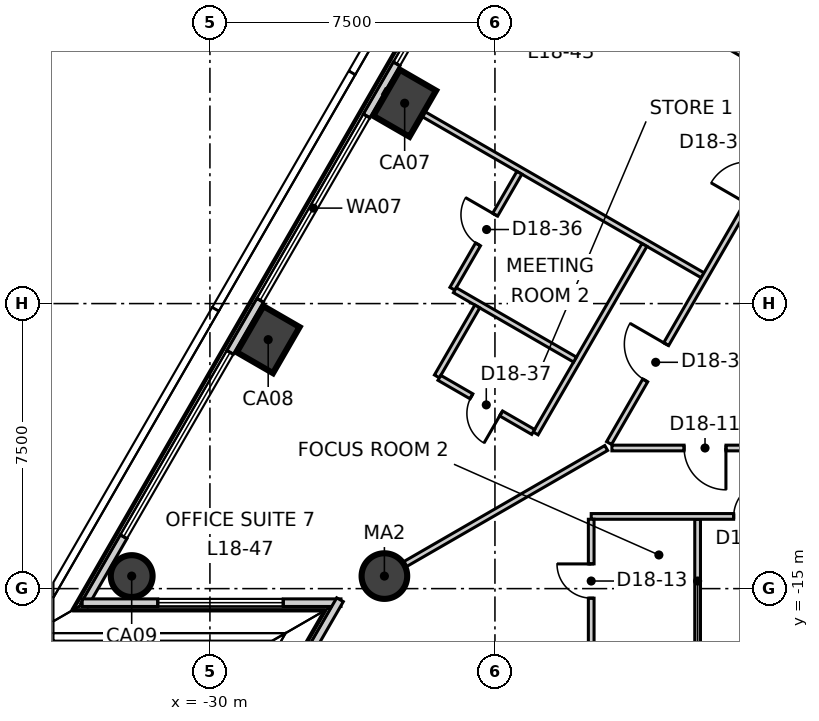
"""IFC4 building model, lengths in metres.
Left out: names, types, materials, properties, quantities, classifications, styles, units other than length and angle.
Written with IfcOpenShell. Run it as: python <this file> out.ifc"""

import sys

from ifc_helpers import new_model, si_unit, direction, frame, frame_2d, origin, origin_2d, place, context, subcontext, project, spatial, rectangle, circle, extrude, element, fill, save


model = new_model("IFC4")
c1 = context("Model", 3, precision=1e-05, world=origin(), true_north=direction((0.0, 1.0)))
c2 = subcontext(c1, "Body", "Model", "MODEL_VIEW")
j1 = project(units=[si_unit("LENGTHUNIT", "METRE"), si_unit("PLANEANGLEUNIT", "RADIAN")], contexts=[c1])
p1 = place(None, origin())
s1 = spatial("IfcSite", under=j1, at=p1, CompositionType="ELEMENT")
p2 = place(p1, origin())
s2 = spatial("IfcBuilding", under=s1, at=p2, CompositionType="ELEMENT")
p3 = place(p2, frame((0.0, 0.0, 83.3)))
s3 = spatial("IfcBuildingStorey", under=s2, at=p3, CompositionType="ELEMENT", Elevation=83.3)
for number, where, z_axis, x_axis in (
    (1, (-24.876, -2.228, -0.3), (0.0, 0.0, 1.0), (0.5, 0.866, 0.0)),
    (2, (-28.467, -8.449, -0.3), (0.0, 0.0, 1.0), (0.5, 0.866, 0.0)),
):
    element("IfcColumn", number, at=place(p3, frame(where, z_axis=z_axis, x_axis=x_axis)), inside=s3, PredefinedType="COLUMN", context=c2, shape_type="SweptSolid", body=[
        extrude(rectangle(XDim=1.4, YDim=1.1, at=origin_2d()), origin(), (0.0, 0.0, 1.0), 4.0),
    ])
p4 = place(p3, frame((-32.059, -14.67, -0.3), z_axis=(0.0, 0.0, 1.0), x_axis=(0.5, 0.866025403784, 0.0)))
e3 = element("IfcColumn", 3, at=p4, inside=s3, PredefinedType="COLUMN", context=c2, shape_type="SweptSolid", body=[
    extrude(circle(Radius=0.55, at=origin_2d()), origin(), (0.0, 0.0, 1.0), 4.0),
])
p5 = place(p3, frame((-25.409, -14.67, -0.3), z_axis=(0.0, 0.0, 1.0), x_axis=(1.0, 0.0, 0.0)))
e4 = element("IfcColumn", 4, at=p5, inside=s3, PredefinedType="COLUMN", context=c2, shape_type="SweptSolid", body=[
    extrude(circle(Radius=0.6, at=origin_2d()), origin(), (0.0, 0.0, 1.0), 4.0),
])
p6 = place(p3, frame((-3.28, 36.577, 0.0), z_axis=(0.0, 0.0, 1.0), x_axis=(-0.500001635065, -0.866024459777, 0.0)))
e5 = element("IfcWall", 5, at=p6, inside=s3, PredefinedType="ELEMENTEDWALL", context=c2, shape_type="SweptSolid", body=[
    extrude(rectangle(XDim=60.053, YDim=0.2, at=frame_2d((30.027, 0.0))), origin(), (0.0, 0.0, 1.0), 3.7),
])
p7 = place(p6, frame((2.094, 0.0, 0.9)))
e6 = element("IfcOpeningElement", 6, at=p7, cuts=e5, PredefinedType="OPENING", context=c2, shape_type="SweptSolid", body=[
    extrude(rectangle(XDim=5.6, YDim=2.5, at=frame_2d((2.8, 1.25))), frame((0.0, 0.11, 0.0), z_axis=(0.0, -1.0, 0.0), x_axis=(1.0, 0.0, 0.0)), (0.0, 0.0, 1.0), 0.22),
])
p8 = place(p6, frame((9.278, 0.0, 0.9)))
e7 = element("IfcOpeningElement", 7, at=p8, cuts=e5, PredefinedType="OPENING", context=c2, shape_type="SweptSolid", body=[
    extrude(rectangle(XDim=5.6, YDim=2.5, at=frame_2d((2.8, 1.25))), frame((0.0, 0.11, 0.0), z_axis=(0.0, -1.0, 0.0), x_axis=(1.0, 0.0, 0.0)), (0.0, 0.0, 1.0), 0.22),
])
p9 = place(p6, frame((16.461, 0.0, 0.9)))
e8 = element("IfcOpeningElement", 8, at=p9, cuts=e5, PredefinedType="OPENING", context=c2, shape_type="SweptSolid", body=[
    extrude(rectangle(XDim=5.6, YDim=2.5, at=frame_2d((2.8, 1.25))), frame((0.0, 0.11, 0.0), z_axis=(0.0, -1.0, 0.0), x_axis=(1.0, 0.0, 0.0)), (0.0, 0.0, 1.0), 0.22),
])
p10 = place(p6, frame((23.645, 0.0, 0.9)))
e9 = element("IfcOpeningElement", 9, at=p10, cuts=e5, PredefinedType="OPENING", context=c2, shape_type="SweptSolid", body=[
    extrude(rectangle(XDim=5.6, YDim=2.5, at=frame_2d((2.8, 1.25))), frame((0.0, 0.11, 0.0), z_axis=(0.0, -1.0, 0.0), x_axis=(1.0, 0.0, 0.0)), (0.0, 0.0, 1.0), 0.22),
])
p11 = place(p6, frame((30.828, 0.0, 0.9)))
e10 = element("IfcOpeningElement", 10, at=p11, cuts=e5, PredefinedType="OPENING", context=c2, shape_type="SweptSolid", body=[
    extrude(rectangle(XDim=5.6, YDim=2.5, at=frame_2d((2.8, 1.25))), frame((0.0, 0.11, 0.0), z_axis=(0.0, -1.0, 0.0), x_axis=(1.0, 0.0, 0.0)), (0.0, 0.0, 1.0), 0.22),
])
p12 = place(p6, frame((38.012, 0.0, 0.9)))
e11 = element("IfcOpeningElement", 11, at=p12, cuts=e5, PredefinedType="OPENING", context=c2, shape_type="SweptSolid", body=[
    extrude(rectangle(XDim=5.6, YDim=2.5, at=frame_2d((2.8, 1.25))), frame((0.0, 0.11, 0.0), z_axis=(0.0, -1.0, 0.0), x_axis=(1.0, 0.0, 0.0)), (0.0, 0.0, 1.0), 0.22),
])
p13 = place(p6, frame((45.195, 0.0, 0.9)))
e12 = element("IfcOpeningElement", 12, at=p13, cuts=e5, PredefinedType="OPENING", context=c2, shape_type="SweptSolid", body=[
    extrude(rectangle(XDim=5.6, YDim=2.5, at=frame_2d((2.8, 1.25))), frame((0.0, 0.11, 0.0), z_axis=(0.0, -1.0, 0.0), x_axis=(1.0, 0.0, 0.0)), (0.0, 0.0, 1.0), 0.22),
])
p14 = place(p6, frame((52.379, 0.0, 0.9)))
e13 = element("IfcOpeningElement", 13, at=p14, cuts=e5, PredefinedType="OPENING", context=c2, shape_type="SweptSolid", body=[
    extrude(rectangle(XDim=5.6, YDim=2.5, at=frame_2d((2.8, 1.25))), frame((0.0, 0.11, 0.0), z_axis=(0.0, -1.0, 0.0), x_axis=(1.0, 0.0, 0.0)), (0.0, 0.0, 1.0), 0.22),
])
p15 = place(p3, frame((-33.362, -15.37, 0.0), z_axis=(0.0, 0.0, 1.0), x_axis=(1.0, 0.0, 0.0)))
e14 = element("IfcWall", 14, at=p15, inside=s3, PredefinedType="ELEMENTEDWALL", context=c2, shape_type="SweptSolid", body=[
    extrude(rectangle(XDim=6.81, YDim=0.2, at=frame_2d((3.405, 0.0))), origin(), (0.0, 0.0, 1.0), 3.7),
])
p16 = place(p15, frame((1.99, 0.0, 0.9)))
e15 = element("IfcOpeningElement", 15, at=p16, cuts=e14, PredefinedType="OPENING", context=c2, shape_type="SweptSolid", body=[
    extrude(rectangle(XDim=3.3, YDim=2.5, at=frame_2d((1.65, 1.25))), frame((0.0, 0.11, 0.0), z_axis=(0.0, -1.0, 0.0), x_axis=(1.0, 0.0, 0.0)), (0.0, 0.0, 1.0), 0.22),
])
p17 = place(p3, frame((-26.577, -15.292, 0.0), z_axis=(0.0, 0.0, 1.0), x_axis=(-0.499983120418, -0.866035148996, 0.0)))
e16 = element("IfcWall", 16, at=p17, inside=s3, PredefinedType="ELEMENTEDWALL", context=c2, shape_type="SweptSolid", body=[
    extrude(rectangle(XDim=6.81, YDim=0.2, at=frame_2d((3.405, 0.0))), origin(), (0.0, 0.0, 1.0), 3.7),
])
p18 = place(p17, frame((1.39, 0.0, 0.9)))
e17 = element("IfcOpeningElement", 17, at=p18, cuts=e16, PredefinedType="OPENING", context=c2, shape_type="SweptSolid", body=[
    extrude(rectangle(XDim=3.3, YDim=2.5, at=frame_2d((1.65, 1.25))), frame((0.0, 0.11, 0.0), z_axis=(0.0, -1.0, 0.0), x_axis=(1.0, 0.0, 0.0)), (0.0, 0.0, 1.0), 0.22),
])
p19 = place(p3, frame((-25.946, -14.98, 0.0), z_axis=(0.0, 0.0, 1.0), x_axis=(0.866032022822, 0.499988535315, 0.0)))
e18 = element("IfcWall", 18, at=p19, inside=s3, PredefinedType="PARTITIONING", context=c2, shape_type="SweptSolid", body=[
    extrude(rectangle(XDim=7.36, YDim=0.15, at=frame_2d((3.68, 0.0))), origin(), (0.0, 0.0, 1.0), 3.15),
])
p20 = place(p3, frame((-25.413, -1.918, 0.0), z_axis=(0.0, 0.0, 1.0), x_axis=(0.866035557451, -0.499982412921, 0.0)))
e19 = element("IfcWall", 19, at=p20, inside=s3, PredefinedType="PARTITIONING", context=c2, shape_type="SweptSolid", body=[
    extrude(rectangle(XDim=9.674, YDim=0.15, at=frame_2d((4.837, 0.0))), origin(), (0.0, 0.0, 1.0), 3.7),
])
p21 = place(p3, frame((-19.497, -11.17, 0.0), z_axis=(0.0, 0.0, 1.0), x_axis=(0.499998854553, 0.866026065108, 0.0)))
e20 = element("IfcWall", 20, at=p21, inside=s3, PredefinedType="PARTITIONING", context=c2, shape_type="SweptSolid", body=[
    extrude(rectangle(XDim=38.994, YDim=0.15, at=frame_2d((19.497, 0.0))), origin(), (0.0, 0.0, 1.0), 3.7),
])
p22 = place(p21, frame((35.844, 0.0, 0.0)))
e21 = element("IfcOpeningElement", 21, at=p22, cuts=e20, PredefinedType="OPENING", context=c2, shape_type="SweptSolid", body=[
    extrude(rectangle(XDim=1.1, YDim=2.1, at=frame_2d((0.55, 1.05))), frame((0.0, 0.085, 0.0), z_axis=(0.0, -1.0, 0.0), x_axis=(1.0, 0.0, 0.0)), (0.0, 0.0, 1.0), 0.17),
])
p23 = place(p21, frame((26.04, 0.0, 0.0)))
e22 = element("IfcOpeningElement", 22, at=p23, cuts=e20, PredefinedType="OPENING", context=c2, shape_type="SweptSolid", body=[
    extrude(rectangle(XDim=1.1, YDim=2.1, at=frame_2d((0.55, 1.05))), frame((0.0, 0.085, 0.0), z_axis=(0.0, -1.0, 0.0), x_axis=(1.0, 0.0, 0.0)), (0.0, 0.0, 1.0), 0.17),
])
p24 = place(p21, frame((7.272, 0.0, 0.0)))
e23 = element("IfcOpeningElement", 23, at=p24, cuts=e20, PredefinedType="OPENING", context=c2, shape_type="SweptSolid", body=[
    extrude(rectangle(XDim=1.1, YDim=2.1, at=frame_2d((0.55, 1.05))), frame((0.0, 0.085, 0.0), z_axis=(0.0, -1.0, 0.0), x_axis=(1.0, 0.0, 0.0)), (0.0, 0.0, 1.0), 0.17),
])
p25 = place(p21, frame((17.372, 0.0, 0.0)))
e24 = element("IfcOpeningElement", 24, at=p25, cuts=e20, PredefinedType="OPENING", context=c2, shape_type="SweptSolid", body=[
    extrude(rectangle(XDim=0.9, YDim=2.1, at=frame_2d((0.45, 1.05))), frame((0.0, 0.085, 0.0), z_axis=(0.0, -1.0, 0.0), x_axis=(1.0, 0.0, 0.0)), (0.0, 0.0, 1.0), 0.17),
])
p26 = place(p21, frame((14.172, 0.0, 0.0)))
e25 = element("IfcOpeningElement", 25, at=p26, cuts=e20, PredefinedType="OPENING", context=c2, shape_type="SweptSolid", body=[
    extrude(rectangle(XDim=0.9, YDim=2.1, at=frame_2d((0.45, 1.05))), frame((0.0, 0.085, 0.0), z_axis=(0.0, -1.0, 0.0), x_axis=(1.0, 0.0, 0.0)), (0.0, 0.0, 1.0), 0.17),
])
p27 = place(p21, frame((11.272, 0.0, 0.0)))
e26 = element("IfcOpeningElement", 26, at=p27, cuts=e20, PredefinedType="OPENING", context=c2, shape_type="SweptSolid", body=[
    extrude(rectangle(XDim=1.0, YDim=2.1, at=frame_2d((0.5, 1.05))), frame((0.0, 0.085, 0.0), z_axis=(0.0, -1.0, 0.0), x_axis=(1.0, 0.0, 0.0)), (0.0, 0.0, 1.0), 0.17),
])
p28 = place(p21, frame((1.904, 0.0, 0.0)))
e27 = element("IfcOpeningElement", 27, at=p28, cuts=e20, PredefinedType="OPENING", context=c2, shape_type="SweptSolid", body=[
    extrude(rectangle(XDim=1.1, YDim=2.1, at=frame_2d((0.55, 1.05))), frame((0.0, 0.085, 0.0), z_axis=(0.0, -1.0, 0.0), x_axis=(1.0, 0.0, 0.0)), (0.0, 0.0, 1.0), 0.17),
])
p29 = place(p3, frame((-19.422, -11.3, 0.0), z_axis=(0.0, 0.0, 1.0), x_axis=(1.0, 0.0, 0.0)))
e28 = element("IfcWall", 28, at=p29, inside=s3, PredefinedType="PARTITIONING", context=c2, shape_type="SweptSolid", body=[
    extrude(rectangle(XDim=38.994, YDim=0.15, at=frame_2d((19.497, 0.0))), origin(), (0.0, 0.0, 1.0), 3.7),
])
p30 = place(p29, frame((1.9, 0.0, 0.0)))
e29 = element("IfcOpeningElement", 29, at=p30, cuts=e28, PredefinedType="OPENING", context=c2, shape_type="SweptSolid", body=[
    extrude(rectangle(XDim=1.1, YDim=2.1, at=frame_2d((0.55, 1.05))), frame((0.0, 0.085, 0.0), z_axis=(0.0, -1.0, 0.0), x_axis=(1.0, 0.0, 0.0)), (0.0, 0.0, 1.0), 0.17),
])
p31 = place(p29, frame((11.705, 0.0, 0.0)))
e30 = element("IfcOpeningElement", 30, at=p31, cuts=e28, PredefinedType="OPENING", context=c2, shape_type="SweptSolid", body=[
    extrude(rectangle(XDim=1.1, YDim=2.1, at=frame_2d((0.55, 1.05))), frame((0.0, 0.085, 0.0), z_axis=(0.0, -1.0, 0.0), x_axis=(1.0, 0.0, 0.0)), (0.0, 0.0, 1.0), 0.17),
])
p32 = place(p29, frame((6.405, 0.0, 0.0)))
e31 = element("IfcOpeningElement", 31, at=p32, cuts=e28, PredefinedType="OPENING", context=c2, shape_type="SweptSolid", body=[
    extrude(rectangle(XDim=0.9, YDim=2.1, at=frame_2d((0.45, 1.05))), frame((0.0, 0.085, 0.0), z_axis=(0.0, -1.0, 0.0), x_axis=(1.0, 0.0, 0.0)), (0.0, 0.0, 1.0), 0.17),
])
p33 = place(p29, frame((9.405, 0.0, 0.0)))
e32 = element("IfcOpeningElement", 32, at=p33, cuts=e28, PredefinedType="OPENING", context=c2, shape_type="SweptSolid", body=[
    extrude(rectangle(XDim=0.9, YDim=2.1, at=frame_2d((0.45, 1.05))), frame((0.0, 0.085, 0.0), z_axis=(0.0, -1.0, 0.0), x_axis=(1.0, 0.0, 0.0)), (0.0, 0.0, 1.0), 0.17),
])
p34 = place(p29, frame((22.472, 0.0, 0.0)))
e33 = element("IfcOpeningElement", 33, at=p34, cuts=e28, PredefinedType="OPENING", context=c2, shape_type="SweptSolid", body=[
    extrude(rectangle(XDim=1.0, YDim=2.1, at=frame_2d((0.5, 1.05))), frame((0.0, 0.085, 0.0), z_axis=(0.0, -1.0, 0.0), x_axis=(1.0, 0.0, 0.0)), (0.0, 0.0, 1.0), 0.17),
])
p35 = place(p29, frame((29.656, 0.0, 0.0)))
e34 = element("IfcOpeningElement", 34, at=p35, cuts=e28, PredefinedType="OPENING", context=c2, shape_type="SweptSolid", body=[
    extrude(rectangle(XDim=1.0, YDim=2.1, at=frame_2d((0.5, 1.05))), frame((0.0, 0.085, 0.0), z_axis=(0.0, -1.0, 0.0), x_axis=(1.0, 0.0, 0.0)), (0.0, 0.0, 1.0), 0.17),
])
p36 = place(p29, frame((35.839, 0.0, 0.0)))
e35 = element("IfcOpeningElement", 35, at=p36, cuts=e28, PredefinedType="OPENING", context=c2, shape_type="SweptSolid", body=[
    extrude(rectangle(XDim=1.1, YDim=2.1, at=frame_2d((0.55, 1.05))), frame((0.0, 0.085, 0.0), z_axis=(0.0, -1.0, 0.0), x_axis=(1.0, 0.0, 0.0)), (0.0, 0.0, 1.0), 0.17),
])
p37 = place(p3, frame((-17.239, -0.209, 0.0), z_axis=(0.0, 0.0, 1.0), x_axis=(0.866031223622, -0.49998991961, 0.0)))
e36 = element("IfcWall", 36, at=p37, inside=s3, PredefinedType="PARTITIONING", context=c2, shape_type="SweptSolid", body=[
    extrude(rectangle(XDim=3.45, YDim=0.15, at=frame_2d((1.725, 0.0))), origin(), (0.0, 0.0, 1.0), 3.7),
])
p38 = place(p3, frame((-21.429, -10.916, 0.0), z_axis=(0.0, 0.0, 1.0), x_axis=(0.500069422629, 0.865985318901, 0.0)))
e37 = element("IfcWall", 37, at=p38, inside=s3, PredefinedType="PARTITIONING", context=c2, shape_type="SweptSolid", body=[
    extrude(rectangle(XDim=5.725, YDim=0.15, at=frame_2d((2.863, 0.0))), origin(), (0.0, 0.0, 1.0), 3.7),
])
p39 = place(p3, frame((-23.62, -7.11, 0.0), z_axis=(0.0, 0.0, 1.0), x_axis=(0.500236053335, 0.865889075427, 0.0)))
e38 = element("IfcWall", 38, at=p39, inside=s3, PredefinedType="PARTITIONING", context=c2, shape_type="SweptSolid", body=[
    extrude(rectangle(XDim=3.525, YDim=0.15, at=frame_2d((1.762, 0.0))), origin(), (0.0, 0.0, 1.0), 3.7),
])
p40 = place(p39, frame((1.35, 0.0, 0.0)))
e39 = element("IfcOpeningElement", 39, at=p40, cuts=e38, PredefinedType="OPENING", context=c2, shape_type="SweptSolid", body=[
    extrude(rectangle(XDim=0.9, YDim=2.1, at=frame_2d((0.45, 1.05))), frame((0.0, 0.085, 0.0), z_axis=(0.0, -1.0, 0.0), x_axis=(1.0, 0.0, 0.0)), (0.0, 0.0, 1.0), 0.17),
])
p41 = place(p3, frame((-23.555, -7.148, 0.0), z_axis=(0.0, 0.0, 1.0), x_axis=(0.866024069551, -0.500002310952, 0.0)))
e40 = element("IfcWall", 40, at=p41, inside=s3, PredefinedType="PARTITIONING", context=c2, shape_type="SweptSolid", body=[
    extrude(rectangle(XDim=3.65, YDim=0.15, at=frame_2d((1.825, 0.0))), origin(), (0.0, 0.0, 1.0), 3.7),
])
p42 = place(p3, frame((-24.027, -9.416, 0.0), z_axis=(0.0, 0.0, 1.0), x_axis=(0.500017365573, 0.866015377534, 0.0)))
e41 = element("IfcWall", 41, at=p42, inside=s3, PredefinedType="PARTITIONING", context=c2, shape_type="SweptSolid", body=[
    extrude(rectangle(XDim=2.126, YDim=0.15, at=frame_2d((1.063, 0.0))), origin(), (0.0, 0.0, 1.0), 3.7),
])
p43 = place(p3, frame((-23.962, -9.453, 0.0), z_axis=(0.0, 0.0, 1.0), x_axis=(0.866004402611, -0.500036373335, 0.0)))
e42 = element("IfcWall", 42, at=p43, inside=s3, PredefinedType="PARTITIONING", context=c2, shape_type="SweptSolid", body=[
    extrude(rectangle(XDim=2.85, YDim=0.15, at=frame_2d((1.425, 0.0))), origin(), (0.0, 0.0, 1.0), 3.7),
])
p44 = place(p43, frame((0.975, 0.0, 0.0)))
e43 = element("IfcOpeningElement", 43, at=p44, cuts=e42, PredefinedType="OPENING", context=c2, shape_type="SweptSolid", body=[
    extrude(rectangle(XDim=0.9, YDim=2.1, at=frame_2d((0.45, 1.05))), frame((0.0, 0.085, 0.0), z_axis=(0.0, -1.0, 0.0), x_axis=(1.0, 0.0, 0.0)), (0.0, 0.0, 1.0), 0.17),
])
p45 = place(p3, frame((-17.167, -16.425, 0.0), z_axis=(0.0, 0.0, 1.0), x_axis=(0.0, 1.0, 0.0)))
e44 = element("IfcWall", 44, at=p45, inside=s3, PredefinedType="PARTITIONING", context=c2, shape_type="SweptSolid", body=[
    extrude(rectangle(XDim=3.25, YDim=0.15, at=frame_2d((1.625, 0.0))), origin(), (0.0, 0.0, 1.0), 3.7),
])
p46 = place(p3, frame((-19.967, -13.1, 0.0), z_axis=(0.0, 0.0, 1.0), x_axis=(1.0, 0.0, 0.0)))
e45 = element("IfcWall", 45, at=p46, inside=s3, PredefinedType="PARTITIONING", context=c2, shape_type="SweptSolid", body=[
    extrude(rectangle(XDim=5.525, YDim=0.15, at=frame_2d((2.763, 0.0))), origin(), (0.0, 0.0, 1.0), 3.7),
])
p47 = place(p46, frame((3.75, 0.0, 0.0)))
e46 = element("IfcOpeningElement", 46, at=p47, cuts=e45, PredefinedType="OPENING", context=c2, shape_type="SweptSolid", body=[
    extrude(rectangle(XDim=0.9, YDim=2.1, at=frame_2d((0.45, 1.05))), frame((0.0, 0.085, 0.0), z_axis=(0.0, -1.0, 0.0), x_axis=(1.0, 0.0, 0.0)), (0.0, 0.0, 1.0), 0.17),
])
p48 = place(p3, frame((-19.967, -16.425, 0.0), z_axis=(0.0, 0.0, 1.0), x_axis=(0.0, 1.0, 0.0)))
e47 = element("IfcWall", 47, at=p48, inside=s3, PredefinedType="PARTITIONING", context=c2, shape_type="SweptSolid", body=[
    extrude(rectangle(XDim=3.25, YDim=0.15, at=frame_2d((1.625, 0.0))), origin(), (0.0, 0.0, 1.0), 3.7),
])
p49 = place(p48, frame((1.175, 0.0, 0.0)))
e48 = element("IfcOpeningElement", 48, at=p49, cuts=e47, PredefinedType="OPENING", context=c2, shape_type="SweptSolid", body=[
    extrude(rectangle(XDim=0.9, YDim=2.1, at=frame_2d((0.45, 1.05))), frame((0.0, 0.085, 0.0), z_axis=(0.0, -1.0, 0.0), x_axis=(1.0, 0.0, 0.0)), (0.0, 0.0, 1.0), 0.17),
])
p50 = place(p12, origin())
e49 = element("IfcWindow", 49, at=p50, inside=s3, PartitioningType="SINGLE_PANEL", PredefinedType="WINDOW", context=c2, shape_type="SweptSolid", body=[
    extrude(rectangle(XDim=5.6, YDim=2.5, at=frame_2d((2.8, 1.25))), frame((0.0, 0.03, 0.0), z_axis=(0.0, -1.0, 0.0), x_axis=(1.0, 0.0, 0.0)), (0.0, 0.0, 1.0), 0.06),
])
fill(e11, e49)
p51 = place(p13, origin())
e50 = element("IfcWindow", 50, at=p51, inside=s3, PartitioningType="SINGLE_PANEL", PredefinedType="WINDOW", context=c2, shape_type="SweptSolid", body=[
    extrude(rectangle(XDim=5.6, YDim=2.5, at=frame_2d((2.8, 1.25))), frame((0.0, 0.03, 0.0), z_axis=(0.0, -1.0, 0.0), x_axis=(1.0, 0.0, 0.0)), (0.0, 0.0, 1.0), 0.06),
])
fill(e12, e50)
p52 = place(p14, origin())
e51 = element("IfcWindow", 51, at=p52, inside=s3, PartitioningType="SINGLE_PANEL", PredefinedType="WINDOW", context=c2, shape_type="SweptSolid", body=[
    extrude(rectangle(XDim=5.6, YDim=2.5, at=frame_2d((2.8, 1.25))), frame((0.0, 0.03, 0.0), z_axis=(0.0, -1.0, 0.0), x_axis=(1.0, 0.0, 0.0)), (0.0, 0.0, 1.0), 0.06),
])
fill(e13, e51)
p53 = place(p16, origin())
e52 = element("IfcWindow", 52, at=p53, inside=s3, PartitioningType="SINGLE_PANEL", PredefinedType="WINDOW", context=c2, shape_type="SweptSolid", body=[
    extrude(rectangle(XDim=3.3, YDim=2.5, at=frame_2d((1.65, 1.25))), frame((0.0, 0.03, 0.0), z_axis=(0.0, -1.0, 0.0), x_axis=(1.0, 0.0, 0.0)), (0.0, 0.0, 1.0), 0.06),
])
fill(e15, e52)
p54 = place(p30, origin())
e53 = element("IfcDoor", 53, at=p54, inside=s3, OperationType="SINGLE_SWING_RIGHT", PredefinedType="DOOR", context=c2, shape_type="SweptSolid", body=[
    extrude(rectangle(XDim=1.1, YDim=2.1, at=frame_2d((0.55, 1.05))), frame((0.0, 0.025, 0.0), z_axis=(0.0, -1.0, 0.0), x_axis=(1.0, 0.0, 0.0)), (0.0, 0.0, 1.0), 0.05),
])
fill(e29, e53)
p55 = place(p47, origin())
e54 = element("IfcDoor", 54, at=p55, inside=s3, OperationType="SINGLE_SWING_LEFT", PredefinedType="DOOR", context=c2, shape_type="SweptSolid", body=[
    extrude(rectangle(XDim=0.9, YDim=2.1, at=frame_2d((0.45, 1.05))), frame((0.0, 0.025, 0.0), z_axis=(0.0, -1.0, 0.0), x_axis=(1.0, 0.0, 0.0)), (0.0, 0.0, 1.0), 0.05),
])
fill(e46, e54)
p56 = place(p49, origin())
e55 = element("IfcDoor", 55, at=p56, inside=s3, OperationType="SINGLE_SWING_LEFT", PredefinedType="DOOR", context=c2, shape_type="SweptSolid", body=[
    extrude(rectangle(XDim=0.9, YDim=2.1, at=frame_2d((0.45, 1.05))), frame((0.0, 0.025, 0.0), z_axis=(0.0, -1.0, 0.0), x_axis=(1.0, 0.0, 0.0)), (0.0, 0.0, 1.0), 0.05),
])
fill(e48, e55)
p57 = place(p28, origin())
e56 = element("IfcDoor", 56, at=p57, inside=s3, OperationType="SINGLE_SWING_LEFT", PredefinedType="DOOR", context=c2, shape_type="SweptSolid", body=[
    extrude(rectangle(XDim=1.1, YDim=2.1, at=frame_2d((0.55, 1.05))), frame((0.0, 0.025, 0.0), z_axis=(0.0, -1.0, 0.0), x_axis=(1.0, 0.0, 0.0)), (0.0, 0.0, 1.0), 0.05),
])
fill(e27, e56)
p58 = place(p40, origin())
e57 = element("IfcDoor", 57, at=p58, inside=s3, OperationType="SINGLE_SWING_LEFT", PredefinedType="DOOR", context=c2, shape_type="SweptSolid", body=[
    extrude(rectangle(XDim=0.9, YDim=2.1, at=frame_2d((0.45, 1.05))), frame((0.0, 0.025, 0.0), z_axis=(0.0, -1.0, 0.0), x_axis=(1.0, 0.0, 0.0)), (0.0, 0.0, 1.0), 0.05),
])
fill(e39, e57)
p59 = place(p44, origin())
e58 = element("IfcDoor", 58, at=p59, inside=s3, OperationType="SINGLE_SWING_RIGHT", PredefinedType="DOOR", context=c2, shape_type="SweptSolid", body=[
    extrude(rectangle(XDim=0.9, YDim=2.1, at=frame_2d((0.45, 1.05))), frame((0.0, 0.025, 0.0), z_axis=(0.0, -1.0, 0.0), x_axis=(1.0, 0.0, 0.0)), (0.0, 0.0, 1.0), 0.05),
])
fill(e43, e58)
save(model, sys.argv[1])
